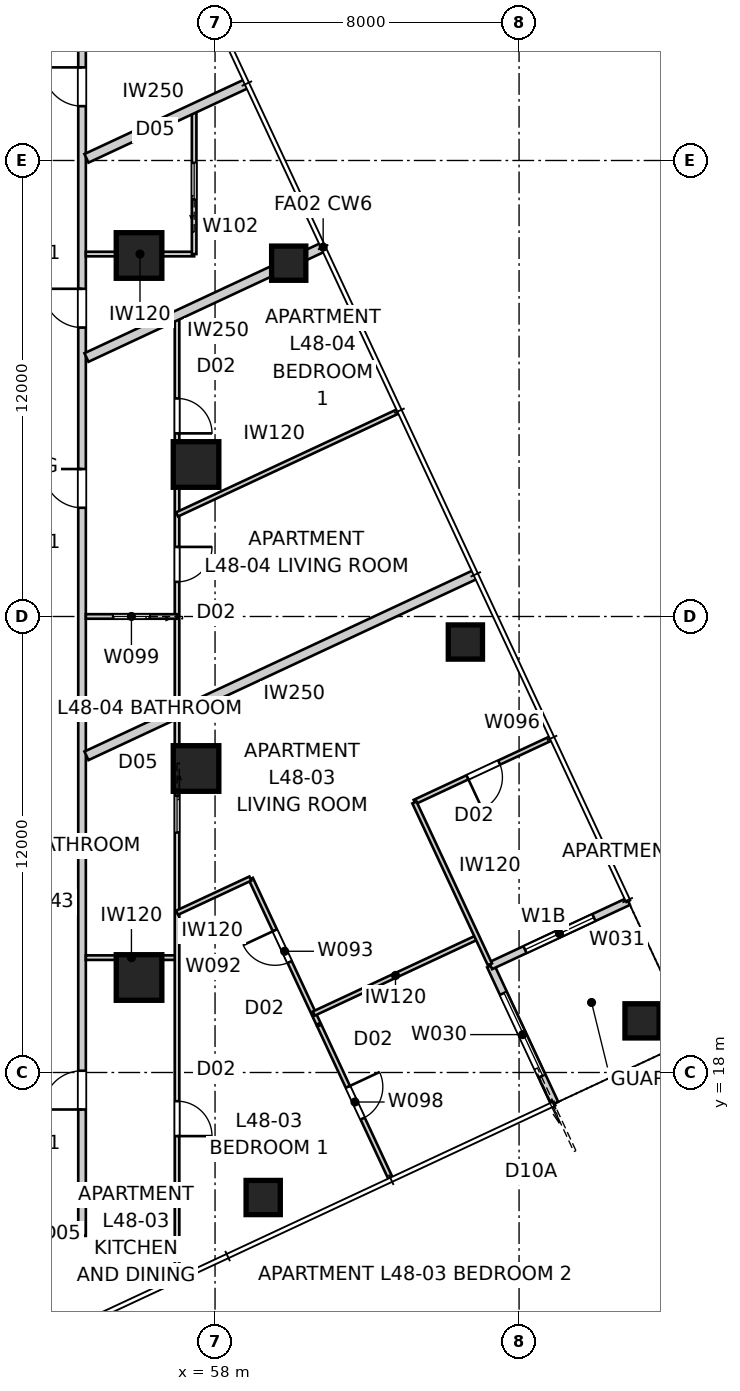
"""IFC4 building model, lengths in metres.
Left out: names, types, materials, properties, quantities, classifications, styles, units other than length and angle.
Written with IfcOpenShell. Run it as: python <this file> out.ifc"""

import sys

from ifc_helpers import new_model, si_unit, direction, frame, frame_2d, origin, origin_2d, place, context, subcontext, project, spatial, rectangle, extrude, element, fill, save


model = new_model("IFC4")
c1 = context("Model", 3, precision=1e-05, world=origin(), true_north=direction((0.0, 1.0)))
c2 = subcontext(c1, "Body", "Model", "MODEL_VIEW")
j1 = project(units=[si_unit("LENGTHUNIT", "METRE"), si_unit("PLANEANGLEUNIT", "RADIAN")], contexts=[c1])
p1 = place(None, origin())
s1 = spatial("IfcSite", under=j1, at=p1, CompositionType="ELEMENT")
p2 = place(p1, origin())
s2 = spatial("IfcBuilding", under=s1, at=p2, CompositionType="ELEMENT")
p3 = place(p2, frame((0.0, 0.0, 176.0)))
s3 = spatial("IfcBuildingStorey", under=s2, at=p3, CompositionType="ELEMENT", Elevation=176.0)
for number, where, z_axis, x_axis in (
    (1, (59.267, 14.71, -0.15), (0.0, 0.0, 1.0), (1.0, 0.0, 0.0)),
    (2, (69.236, 19.359, -0.15), (0.0, 0.0, 1.0), (1.0, 0.0, 0.0)),
    (3, (64.588, 29.328, -0.15), (0.0, 0.0, 1.0), (1.0, 0.0, 0.0)),
    (4, (59.939, 39.298, -0.15), (0.0, 0.0, 1.0), (1.0, 0.0, 0.0)),
):
    element("IfcColumn", number, at=place(p3, frame(where, z_axis=z_axis, x_axis=x_axis)), inside=s3, PredefinedType="COLUMN", context=c2, shape_type="SweptSolid", body=[
        extrude(rectangle(XDim=0.9, YDim=0.9, at=origin_2d()), origin(), (0.0, 0.0, 1.0), 3.55),
    ])
for number, where, z_axis, x_axis in (
    (5, (57.5, 26.0, 0.0), (0.0, 0.0, 1.0), (1.0, 0.0, 0.0)),
    (6, (57.5, 34.0, 0.0), (0.0, 0.0, 1.0), (1.0, 0.0, 0.0)),
    (7, (56.0, 39.5, 0.0), (0.0, 0.0, 1.0), (1.0, 0.0, 0.0)),
    (8, (56.0, 20.5, 0.0), (0.0, 0.0, 1.0), (1.0, 0.0, 0.0)),
):
    element("IfcColumn", number, at=place(p3, frame(where, z_axis=z_axis, x_axis=x_axis)), inside=s3, PredefinedType="COLUMN", context=c2, shape_type="SweptSolid", body=[
        extrude(rectangle(XDim=1.2, YDim=1.2, at=origin_2d()), origin(), (0.0, 0.0, 1.0), 3.4),
    ])
p4 = place(p3, frame((66.94, 17.185, 0.0), z_axis=(0.0, 0.0, 1.0), x_axis=(-0.422658246362, 0.906289140828, 0.0)))
e9 = element("IfcWall", 9, at=p4, inside=s3, PredefinedType="SOLIDWALL", context=c2, shape_type="SweptSolid", body=[
    extrude(rectangle(XDim=4.0, YDim=0.2, at=frame_2d((2.0, 0.0))), origin(), (0.0, 0.0, 1.0), 3.25),
])
p5 = place(p4, frame((0.8, 0.0, 0.0)))
e10 = element("IfcOpeningElement", 10, at=p5, cuts=e9, PredefinedType="OPENING", context=c2, shape_type="SweptSolid", body=[
    extrude(rectangle(XDim=2.4, YDim=2.1, at=frame_2d((1.2, 1.05))), frame((0.0, 0.11, 0.0), z_axis=(0.0, -1.0, 0.0), x_axis=(1.0, 0.0, 0.0)), (0.0, 0.0, 1.0), 0.22),
])
p6 = place(p3, frame((65.25, 20.81, 0.0), z_axis=(0.0, 0.0, 1.0), x_axis=(0.906289140828, 0.422658246362, 0.0)))
e11 = element("IfcWall", 11, at=p6, inside=s3, PredefinedType="SOLIDWALL", context=c2, shape_type="SweptSolid", body=[
    extrude(rectangle(XDim=4.0, YDim=0.2, at=frame_2d((2.0, 0.0))), origin(), (0.0, 0.0, 1.0), 3.25),
])
p7 = place(p6, frame((1.0, 0.0, 0.45)))
e12 = element("IfcOpeningElement", 12, at=p7, cuts=e11, PredefinedType="OPENING", context=c2, shape_type="SweptSolid", body=[
    extrude(rectangle(XDim=2.0, YDim=1.8, at=frame_2d((1.0, 0.9))), frame((0.0, 0.11, 0.0), z_axis=(0.0, -1.0, 0.0), x_axis=(1.0, 0.0, 0.0)), (0.0, 0.0, 1.0), 0.22),
])
p8 = place(p3, frame((49.242, 13.7, 0.0), z_axis=(0.0, 0.0, 1.0), x_axis=(1.0, 0.0, 0.0)))
e13 = element("IfcWall", 13, at=p8, inside=s3, PredefinedType="PARTITIONING", context=c2, shape_type="SweptSolid", body=[
    extrude(rectangle(XDim=5.258, YDim=0.2, at=frame_2d((2.629, 0.0))), origin(), (0.0, 0.0, 1.0), 3.25),
])
p9 = place(p3, frame((54.5, 13.7, 0.0), z_axis=(0.0, 0.0, 1.0), x_axis=(0.0, 1.0, 0.0)))
e14 = element("IfcWall", 14, at=p9, inside=s3, PredefinedType="PARTITIONING", context=c2, shape_type="SweptSolid", body=[
    extrude(rectangle(XDim=32.6, YDim=0.2, at=frame_2d((16.3, 0.0))), origin(), (0.0, 0.0, 1.0), 3.25),
])
p10 = place(p9, frame((3.326, 0.0, 0.0)))
e15 = element("IfcOpeningElement", 15, at=p10, cuts=e14, PredefinedType="OPENING", context=c2, shape_type="SweptSolid", body=[
    extrude(rectangle(XDim=1.02, YDim=2.34, at=frame_2d((0.51, 1.17))), frame((0.0, 0.11, 0.0), z_axis=(0.0, -1.0, 0.0), x_axis=(1.0, 0.0, 0.0)), (0.0, 0.0, 1.0), 0.22),
])
p11 = place(p9, frame((19.161, 0.0, 0.0)))
e16 = element("IfcOpeningElement", 16, at=p11, cuts=e14, PredefinedType="OPENING", context=c2, shape_type="SweptSolid", body=[
    extrude(rectangle(XDim=1.02, YDim=2.34, at=frame_2d((0.51, 1.17))), frame((0.0, 0.11, 0.0), z_axis=(0.0, -1.0, 0.0), x_axis=(1.0, 0.0, 0.0)), (0.0, 0.0, 1.0), 0.22),
])
p12 = place(p9, frame((29.73, 0.0, 0.0)))
e17 = element("IfcOpeningElement", 17, at=p12, cuts=e14, PredefinedType="OPENING", context=c2, shape_type="SweptSolid", body=[
    extrude(rectangle(XDim=1.02, YDim=2.34, at=frame_2d((0.51, 1.17))), frame((0.0, 0.11, 0.0), z_axis=(0.0, -1.0, 0.0), x_axis=(1.0, 0.0, 0.0)), (0.0, 0.0, 1.0), 0.22),
])
p13 = place(p9, frame((23.904, 0.0, 0.0)))
e18 = element("IfcOpeningElement", 18, at=p13, cuts=e14, PredefinedType="OPENING", context=c2, shape_type="SweptSolid", body=[
    extrude(rectangle(XDim=1.02, YDim=2.34, at=frame_2d((0.51, 1.17))), frame((0.0, 0.11, 0.0), z_axis=(0.0, -1.0, 0.0), x_axis=(1.0, 0.0, 0.0)), (0.0, 0.0, 1.0), 0.22),
])
p14 = place(p3, frame((64.86, 31.11, 0.0), z_axis=(0.0, 0.0, 1.0), x_axis=(-0.906306714884, -0.422620560972, 0.0)))
e19 = element("IfcWall", 19, at=p14, inside=s3, PredefinedType="PARTITIONING", context=c2, shape_type="SweptSolid", body=[
    extrude(rectangle(XDim=11.302, YDim=0.25, at=frame_2d((5.651, 0.0))), origin(), (0.0, 0.0, 1.0), 3.25),
])
p15 = place(p3, frame((60.845, 39.72, 0.0), z_axis=(0.0, 0.0, 1.0), x_axis=(-0.90631378723, -0.422605394046, 0.0)))
e20 = element("IfcWall", 20, at=p15, inside=s3, PredefinedType="PARTITIONING", context=c2, shape_type="SweptSolid", body=[
    extrude(rectangle(XDim=6.872, YDim=0.25, at=frame_2d((3.436, 0.0))), origin(), (0.0, 0.0, 1.0), 3.25),
])
p16 = place(p3, frame((58.838, 44.025, 0.0), z_axis=(0.0, 0.0, 1.0), x_axis=(-0.906317010604, -0.422598481173, 0.0)))
e21 = element("IfcWall", 21, at=p16, inside=s3, PredefinedType="PARTITIONING", context=c2, shape_type="SweptSolid", body=[
    extrude(rectangle(XDim=4.657, YDim=0.25, at=frame_2d((2.329, 0.0))), origin(), (0.0, 0.0, 1.0), 3.25),
])
p17 = place(p3, frame((54.6, 21.023, 0.0), z_axis=(0.0, 0.0, 1.0), x_axis=(1.0, 0.0, 0.0)))
e22 = element("IfcWall", 22, at=p17, inside=s3, PredefinedType="PARTITIONING", context=c2, shape_type="SweptSolid", body=[
    extrude(rectangle(XDim=2.4, YDim=0.12, at=frame_2d((1.2, 0.0))), origin(), (0.0, 0.0, 1.0), 3.25),
])
p18 = place(p3, frame((57.0, 37.927, 0.0), z_axis=(0.0, 0.0, 1.0), x_axis=(0.0, -1.0, 0.0)))
e23 = element("IfcWall", 23, at=p18, inside=s3, PredefinedType="PARTITIONING", context=c2, shape_type="SweptSolid", body=[
    extrude(rectangle(XDim=25.333, YDim=0.12, at=frame_2d((12.667, 0.0))), origin(), (0.0, 0.0, 1.0), 2.55),
])
p19 = place(p18, frame((20.681, 0.0, 0.0)))
e24 = element("IfcOpeningElement", 24, at=p19, cuts=e23, PredefinedType="OPENING", context=c2, shape_type="SweptSolid", body=[
    extrude(rectangle(XDim=0.92, YDim=2.34, at=frame_2d((0.46, 1.17))), frame((0.0, 0.07, 0.0), z_axis=(0.0, -1.0, 0.0), x_axis=(1.0, 0.0, 0.0)), (0.0, 0.0, 1.0), 0.14),
])
p20 = place(p18, frame((2.188, 0.0, 0.0)))
e25 = element("IfcOpeningElement", 25, at=p20, cuts=e23, PredefinedType="OPENING", context=c2, shape_type="SweptSolid", body=[
    extrude(rectangle(XDim=0.92, YDim=2.34, at=frame_2d((0.46, 1.17))), frame((0.0, 0.07, 0.0), z_axis=(0.0, -1.0, 0.0), x_axis=(1.0, 0.0, 0.0)), (0.0, 0.0, 1.0), 0.14),
])
p21 = place(p18, frame((6.096, 0.0, 0.0)))
e26 = element("IfcOpeningElement", 26, at=p21, cuts=e23, PredefinedType="OPENING", context=c2, shape_type="SweptSolid", body=[
    extrude(rectangle(XDim=0.92, YDim=2.34, at=frame_2d((0.46, 1.17))), frame((0.0, 0.07, 0.0), z_axis=(0.0, -1.0, 0.0), x_axis=(1.0, 0.0, 0.0)), (0.0, 0.0, 1.0), 0.14),
])
p22 = place(p18, frame((12.65, 0.0, 0.0)))
e27 = element("IfcOpeningElement", 27, at=p22, cuts=e23, PredefinedType="OPENING", context=c2, shape_type="SweptSolid", body=[
    extrude(rectangle(XDim=0.96, YDim=2.1, at=frame_2d((0.48, 1.05))), frame((0.0, 0.07, 0.0), z_axis=(0.0, -1.0, 0.0), x_axis=(1.0, 0.0, 0.0)), (0.0, 0.0, 1.0), 0.14),
])
p23 = place(p3, frame((60.721, 19.282, 0.0), z_axis=(0.0, 0.0, 1.0), x_axis=(-0.422625167194, 0.906304566939, 0.0)))
e28 = element("IfcWall", 28, at=p23, inside=s3, PredefinedType="PARTITIONING", context=c2, shape_type="SweptSolid", body=[
    extrude(rectangle(XDim=4.211, YDim=0.12, at=frame_2d((2.105, 0.0))), origin(), (0.0, 0.0, 1.0), 3.25),
])
p24 = place(p23, frame((1.793, 0.0, 0.0)))
e29 = element("IfcOpeningElement", 29, at=p24, cuts=e28, PredefinedType="OPENING", context=c2, shape_type="SweptSolid", body=[
    extrude(rectangle(XDim=0.92, YDim=2.34, at=frame_2d((0.46, 1.17))), frame((0.0, 0.07, 0.0), z_axis=(0.0, -1.0, 0.0), x_axis=(1.0, 0.0, 0.0)), (0.0, 0.0, 1.0), 0.14),
])
p25 = place(p3, frame((58.928, 23.103, 0.0), z_axis=(0.0, 0.0, 1.0), x_axis=(-0.90630329877, -0.422627886727, 0.0)))
e30 = element("IfcWall", 30, at=p25, inside=s3, PredefinedType="PARTITIONING", context=c2, shape_type="SweptSolid", body=[
    extrude(rectangle(XDim=2.128, YDim=0.12, at=frame_2d((1.064, 0.0))), origin(), (0.0, 0.0, 1.0), 3.25),
])
p26 = place(p3, frame((64.901, 21.558, 0.0), z_axis=(0.0, 0.0, 1.0), x_axis=(-0.906315719442, -0.422601250227, 0.0)))
e31 = element("IfcWall", 31, at=p26, inside=s3, PredefinedType="PARTITIONING", context=c2, shape_type="SweptSolid", body=[
    extrude(rectangle(XDim=4.75, YDim=0.12, at=frame_2d((2.375, 0.0))), origin(), (0.0, 0.0, 1.0), 3.25),
])
p27 = place(p3, frame((66.831, 26.789, 0.0), z_axis=(0.0, 0.0, 1.0), x_axis=(-0.9062952203, -0.422645210149, 0.0)))
e32 = element("IfcWall", 32, at=p27, inside=s3, PredefinedType="PARTITIONING", context=c2, shape_type="SweptSolid", body=[
    extrude(rectangle(XDim=3.95, YDim=0.12, at=frame_2d((1.975, 0.0))), origin(), (0.0, 0.0, 1.0), 3.25),
])
p28 = place(p27, frame((1.495, 0.0, 0.0)))
e33 = element("IfcOpeningElement", 33, at=p28, cuts=e32, PredefinedType="OPENING", context=c2, shape_type="SweptSolid", body=[
    extrude(rectangle(XDim=0.92, YDim=2.34, at=frame_2d((0.46, 1.17))), frame((0.0, 0.07, 0.0), z_axis=(0.0, -1.0, 0.0), x_axis=(1.0, 0.0, 0.0)), (0.0, 0.0, 1.0), 0.14),
])
p29 = place(p3, frame((63.246, 25.106, 0.0), z_axis=(0.0, 0.0, 1.0), x_axis=(0.422632354456, -0.906301215362, 0.0)))
e34 = element("IfcWall", 34, at=p29, inside=s3, PredefinedType="PARTITIONING", context=c2, shape_type="SweptSolid", body=[
    extrude(rectangle(XDim=4.7, YDim=0.12, at=frame_2d((2.35, 0.0))), origin(), (0.0, 0.0, 1.0), 3.25),
])
p30 = place(p3, frame((60.744, 19.233, 0.0), z_axis=(0.0, 0.0, 1.0), x_axis=(0.42260518136, -0.906313886403, 0.0)))
e35 = element("IfcWall", 35, at=p30, inside=s3, PredefinedType="PARTITIONING", context=c2, shape_type="SweptSolid", body=[
    extrude(rectangle(XDim=4.435, YDim=0.12, at=frame_2d((2.218, 0.0))), origin(), (0.0, 0.0, 1.0), 3.25),
])
p31 = place(p30, frame((1.778, 0.0, 0.0)))
e36 = element("IfcOpeningElement", 36, at=p31, cuts=e35, PredefinedType="OPENING", context=c2, shape_type="SweptSolid", body=[
    extrude(rectangle(XDim=0.92, YDim=2.34, at=frame_2d((0.46, 1.17))), frame((0.0, 0.07, 0.0), z_axis=(0.0, -1.0, 0.0), x_axis=(1.0, 0.0, 0.0)), (0.0, 0.0, 1.0), 0.14),
])
p32 = place(p3, frame((57.0, 30.001, 0.0), z_axis=(0.0, 0.0, 1.0), x_axis=(-1.0, 0.0, 0.0)))
e37 = element("IfcWall", 37, at=p32, inside=s3, PredefinedType="PARTITIONING", context=c2, shape_type="SweptSolid", body=[
    extrude(rectangle(XDim=2.4, YDim=0.12, at=frame_2d((1.2, 0.0))), origin(), (0.0, 0.0, 1.0), 2.796),
])
p33 = place(p32, frame((0.72, 0.0, 0.0)))
e38 = element("IfcOpeningElement", 38, at=p33, cuts=e37, PredefinedType="OPENING", context=c2, shape_type="SweptSolid", body=[
    extrude(rectangle(XDim=0.96, YDim=2.1, at=frame_2d((0.48, 1.05))), frame((0.0, 0.07, 0.0), z_axis=(0.0, -1.0, 0.0), x_axis=(1.0, 0.0, 0.0)), (0.0, 0.0, 1.0), 0.14),
])
p34 = place(p3, frame((57.0, 32.686, 0.0), z_axis=(0.0, 0.0, 1.0), x_axis=(0.906305562553, 0.422623032129, 0.0)))
e39 = element("IfcWall", 39, at=p34, inside=s3, PredefinedType="PARTITIONING", context=c2, shape_type="SweptSolid", body=[
    extrude(rectangle(XDim=6.417, YDim=0.12, at=frame_2d((3.209, 0.0))), origin(), (0.0, 0.0, 1.0), 3.25),
])
p35 = place(p3, frame((54.6, 39.538, 0.0), z_axis=(0.0, 0.0, 1.0), x_axis=(1.0, 0.0, 0.0)))
e40 = element("IfcWall", 40, at=p35, inside=s3, PredefinedType="PARTITIONING", context=c2, shape_type="SweptSolid", body=[
    extrude(rectangle(XDim=2.85, YDim=0.12, at=frame_2d((1.425, 0.0))), origin(), (0.0, 0.0, 1.0), 3.25),
])
p36 = place(p3, frame((57.45, 39.538, 0.0), z_axis=(0.0, 0.0, 1.0), x_axis=(0.0, 1.0, 0.0)))
e41 = element("IfcWall", 41, at=p36, inside=s3, PredefinedType="PARTITIONING", context=c2, shape_type="SweptSolid", body=[
    extrude(rectangle(XDim=3.84, YDim=0.12, at=frame_2d((1.92, 0.0))), origin(), (0.0, 0.0, 1.0), 3.25),
])
p37 = place(p36, frame((1.44, 0.0, 0.0)))
e42 = element("IfcOpeningElement", 42, at=p37, cuts=e41, PredefinedType="OPENING", context=c2, shape_type="SweptSolid", body=[
    extrude(rectangle(XDim=0.96, YDim=2.1, at=frame_2d((0.48, 1.05))), frame((0.0, 0.07, 0.0), z_axis=(0.0, -1.0, 0.0), x_axis=(1.0, 0.0, 0.0)), (0.0, 0.0, 1.0), 0.14),
])
p38 = place(p5, origin())
e43 = element("IfcDoor", 43, at=p38, inside=s3, OperationType="SLIDING_TO_LEFT", PredefinedType="DOOR", context=c2, shape_type="SweptSolid", body=[
    extrude(rectangle(XDim=2.4, YDim=2.1, at=frame_2d((1.2, 1.05))), frame((0.0, 0.025, 0.0), z_axis=(0.0, -1.0, 0.0), x_axis=(1.0, 0.0, 0.0)), (0.0, 0.0, 1.0), 0.05),
])
fill(e10, e43)
p39 = place(p7, origin())
e44 = element("IfcWindow", 44, at=p39, inside=s3, PartitioningType="SINGLE_PANEL", PredefinedType="WINDOW", context=c2, shape_type="SweptSolid", body=[
    extrude(rectangle(XDim=2.0, YDim=1.8, at=frame_2d((1.0, 0.9))), frame((0.0, 0.03, 0.0), z_axis=(0.0, -1.0, 0.0), x_axis=(1.0, 0.0, 0.0)), (0.0, 0.0, 1.0), 0.06),
])
fill(e12, e44)
p40 = place(p10, origin())
e45 = element("IfcDoor", 45, at=p40, inside=s3, OperationType="SINGLE_SWING_LEFT", PredefinedType="DOOR", context=c2, shape_type="SweptSolid", body=[
    extrude(rectangle(XDim=1.02, YDim=2.34, at=frame_2d((0.51, 1.17))), frame((0.0, 0.025, 0.0), z_axis=(0.0, -1.0, 0.0), x_axis=(1.0, 0.0, 0.0)), (0.0, 0.0, 1.0), 0.05),
])
fill(e15, e45)
p41 = place(p11, origin())
e46 = element("IfcDoor", 46, at=p41, inside=s3, OperationType="SINGLE_SWING_RIGHT", PredefinedType="DOOR", context=c2, shape_type="SweptSolid", body=[
    extrude(rectangle(XDim=1.02, YDim=2.34, at=frame_2d((0.51, 1.17))), frame((0.0, 0.025, 0.0), z_axis=(0.0, -1.0, 0.0), x_axis=(1.0, 0.0, 0.0)), (0.0, 0.0, 1.0), 0.05),
])
fill(e16, e46)
p42 = place(p12, origin())
e47 = element("IfcDoor", 47, at=p42, inside=s3, OperationType="SINGLE_SWING_RIGHT", PredefinedType="DOOR", context=c2, shape_type="SweptSolid", body=[
    extrude(rectangle(XDim=1.02, YDim=2.34, at=frame_2d((0.51, 1.17))), frame((0.0, 0.025, 0.0), z_axis=(0.0, -1.0, 0.0), x_axis=(1.0, 0.0, 0.0)), (0.0, 0.0, 1.0), 0.05),
])
fill(e17, e47)
p43 = place(p13, origin())
e48 = element("IfcDoor", 48, at=p43, inside=s3, OperationType="SINGLE_SWING_RIGHT", PredefinedType="DOOR", context=c2, shape_type="SweptSolid", body=[
    extrude(rectangle(XDim=1.02, YDim=2.34, at=frame_2d((0.51, 1.17))), frame((0.0, 0.025, 0.0), z_axis=(0.0, -1.0, 0.0), x_axis=(1.0, 0.0, 0.0)), (0.0, 0.0, 1.0), 0.05),
])
fill(e18, e48)
p44 = place(p19, origin())
e49 = element("IfcDoor", 49, at=p44, inside=s3, OperationType="SINGLE_SWING_RIGHT", PredefinedType="DOOR", context=c2, shape_type="SweptSolid", body=[
    extrude(rectangle(XDim=0.92, YDim=2.34, at=frame_2d((0.46, 1.17))), frame((0.0, 0.025, 0.0), z_axis=(0.0, -1.0, 0.0), x_axis=(1.0, 0.0, 0.0)), (0.0, 0.0, 1.0), 0.05),
])
fill(e24, e49)
p45 = place(p20, origin())
e50 = element("IfcDoor", 50, at=p45, inside=s3, OperationType="SINGLE_SWING_RIGHT", PredefinedType="DOOR", context=c2, shape_type="SweptSolid", body=[
    extrude(rectangle(XDim=0.92, YDim=2.34, at=frame_2d((0.46, 1.17))), frame((0.0, 0.025, 0.0), z_axis=(0.0, -1.0, 0.0), x_axis=(1.0, 0.0, 0.0)), (0.0, 0.0, 1.0), 0.05),
])
fill(e25, e50)
p46 = place(p21, origin())
e51 = element("IfcDoor", 51, at=p46, inside=s3, OperationType="SINGLE_SWING_LEFT", PredefinedType="DOOR", context=c2, shape_type="SweptSolid", body=[
    extrude(rectangle(XDim=0.92, YDim=2.34, at=frame_2d((0.46, 1.17))), frame((0.0, 0.025, 0.0), z_axis=(0.0, -1.0, 0.0), x_axis=(1.0, 0.0, 0.0)), (0.0, 0.0, 1.0), 0.05),
])
fill(e26, e51)
p47 = place(p33, origin())
e52 = element("IfcDoor", 52, at=p47, inside=s3, OperationType="SLIDING_TO_LEFT", PredefinedType="DOOR", context=c2, shape_type="SweptSolid", body=[
    extrude(rectangle(XDim=0.96, YDim=2.1, at=frame_2d((0.48, 1.05))), frame((0.0, 0.025, 0.0), z_axis=(0.0, -1.0, 0.0), x_axis=(1.0, 0.0, 0.0)), (0.0, 0.0, 1.0), 0.05),
])
fill(e38, e52)
p48 = place(p37, origin())
e53 = element("IfcDoor", 53, at=p48, inside=s3, OperationType="SLIDING_TO_LEFT", PredefinedType="DOOR", context=c2, shape_type="SweptSolid", body=[
    extrude(rectangle(XDim=0.96, YDim=2.1, at=frame_2d((0.48, 1.05))), frame((0.0, 0.025, 0.0), z_axis=(0.0, -1.0, 0.0), x_axis=(1.0, 0.0, 0.0)), (0.0, 0.0, 1.0), 0.05),
])
fill(e42, e53)
p49 = place(p31, origin())
e54 = element("IfcDoor", 54, at=p49, inside=s3, OperationType="SINGLE_SWING_LEFT", PredefinedType="DOOR", context=c2, shape_type="SweptSolid", body=[
    extrude(rectangle(XDim=0.92, YDim=2.34, at=frame_2d((0.46, 1.17))), frame((0.0, 0.025, 0.0), z_axis=(0.0, -1.0, 0.0), x_axis=(1.0, 0.0, 0.0)), (0.0, 0.0, 1.0), 0.05),
])
fill(e36, e54)
p50 = place(p24, origin())
e55 = element("IfcDoor", 55, at=p50, inside=s3, OperationType="SINGLE_SWING_RIGHT", PredefinedType="DOOR", context=c2, shape_type="SweptSolid", body=[
    extrude(rectangle(XDim=0.92, YDim=2.34, at=frame_2d((0.46, 1.17))), frame((0.0, 0.025, 0.0), z_axis=(0.0, -1.0, 0.0), x_axis=(1.0, 0.0, 0.0)), (0.0, 0.0, 1.0), 0.05),
])
fill(e29, e55)
p51 = place(p22, origin())
e56 = element("IfcDoor", 56, at=p51, inside=s3, OperationType="SLIDING_TO_LEFT", PredefinedType="DOOR", context=c2, shape_type="SweptSolid", body=[
    extrude(rectangle(XDim=0.96, YDim=2.1, at=frame_2d((0.48, 1.05))), frame((0.0, 0.025, 0.0), z_axis=(0.0, -1.0, 0.0), x_axis=(1.0, 0.0, 0.0)), (0.0, 0.0, 1.0), 0.05),
])
fill(e27, e56)
p52 = place(p28, origin())
e57 = element("IfcDoor", 57, at=p52, inside=s3, OperationType="SINGLE_SWING_RIGHT", PredefinedType="DOOR", context=c2, shape_type="SweptSolid", body=[
    extrude(rectangle(XDim=0.92, YDim=2.34, at=frame_2d((0.46, 1.17))), frame((0.0, 0.025, 0.0), z_axis=(0.0, -1.0, 0.0), x_axis=(1.0, 0.0, 0.0)), (0.0, 0.0, 1.0), 0.05),
])
fill(e33, e57)
save(model, sys.argv[1])
